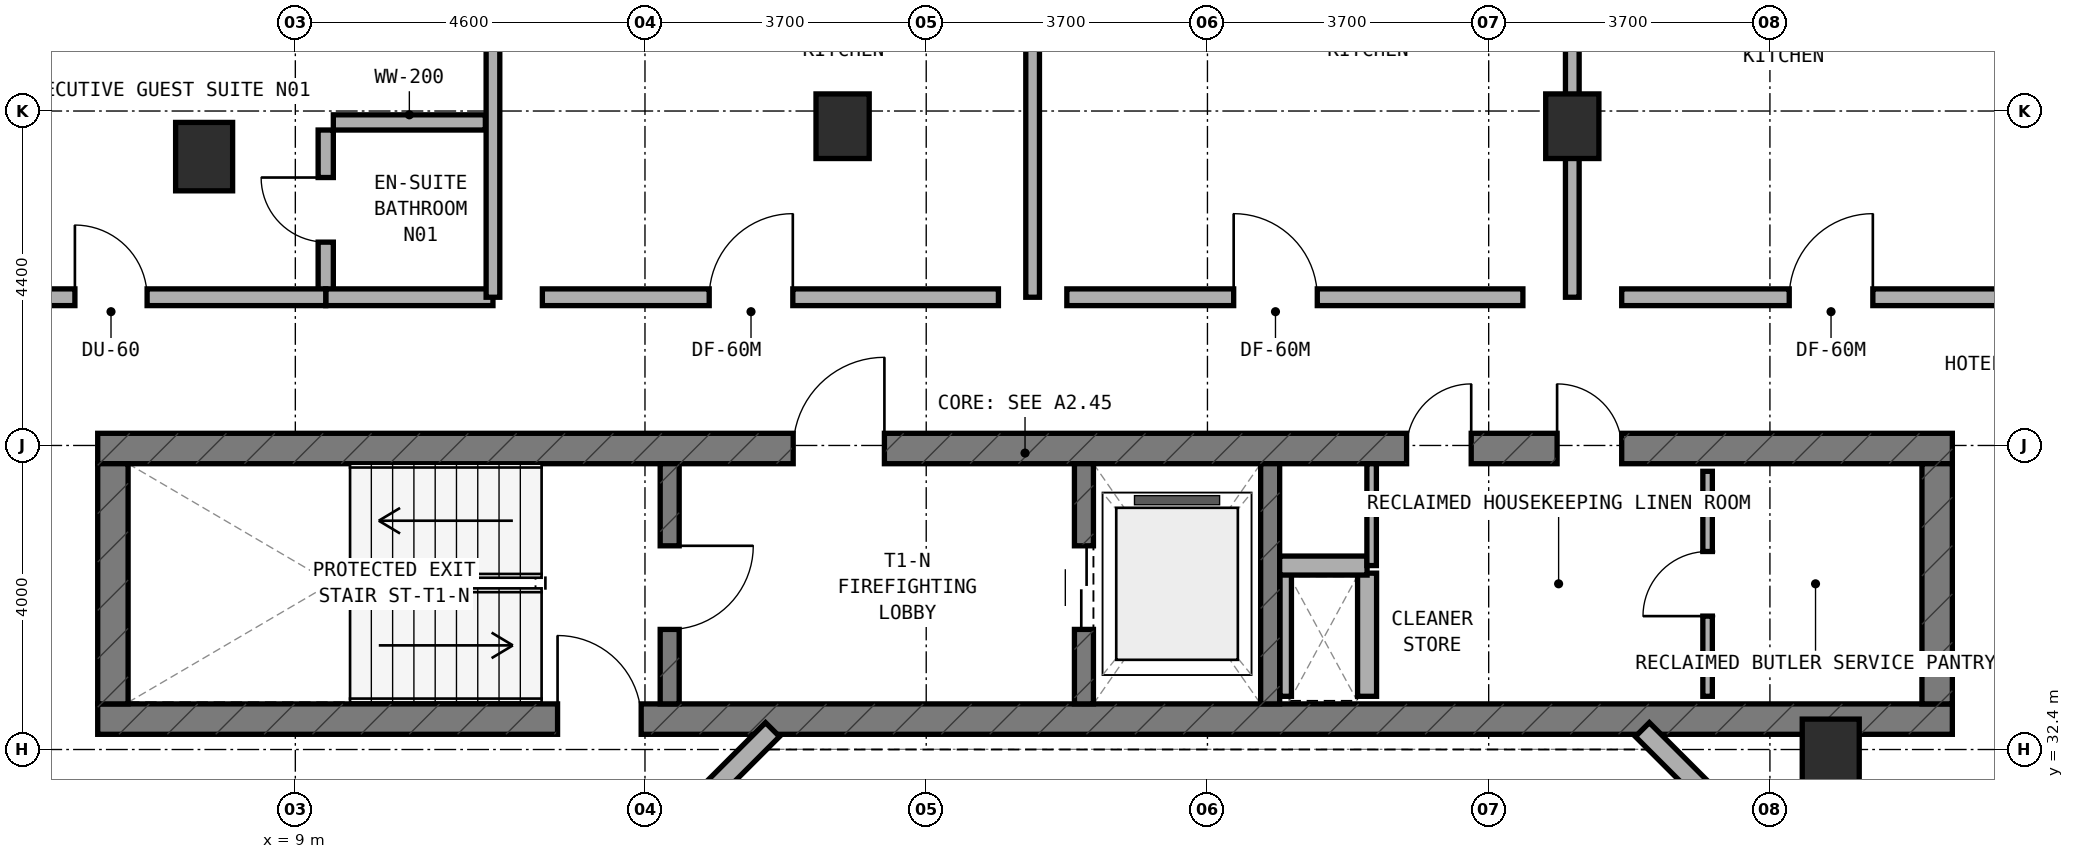
"""IFC4 building model, lengths in metres.
Left out: names, types, materials, properties, quantities, classifications, styles, units other than length and angle.
Written with IfcOpenShell. Run it as: python <this file> out.ifc"""

import sys

from ifc_helpers import new_model, si_unit, direction, frame, frame_2d, origin, origin_2d, place, context, subcontext, project, spatial, rectangle, extrude, element, fill, save


model = new_model("IFC4")
c1 = context("Model", 3, precision=1e-05, world=origin(), true_north=direction((0.0, 1.0)))
c2 = subcontext(c1, "Body", "Model", "MODEL_VIEW")
j1 = project(units=[si_unit("LENGTHUNIT", "METRE"), si_unit("PLANEANGLEUNIT", "RADIAN")], contexts=[c1])
p1 = place(None, origin())
s1 = spatial("IfcSite", under=j1, at=p1, CompositionType="ELEMENT")
p2 = place(p1, origin())
s2 = spatial("IfcBuilding", under=s1, at=p2, CompositionType="ELEMENT")
p3 = place(p2, frame((0.0, 0.0, 209.9)))
s3 = spatial("IfcBuildingStorey", under=s2, at=p3, CompositionType="ELEMENT", Elevation=209.9)
p4 = place(p3, frame((6.4, 32.8, 0.0), z_axis=(0.0, 0.0, 1.0), x_axis=(1.0, 0.0, 0.0)))
e1 = element("IfcWall", 1, at=p4, inside=s3, PredefinedType="SHEAR", context=c2, shape_type="SweptSolid", body=[
    extrude(rectangle(XDim=24.4, YDim=0.4, at=frame_2d((12.2, 0.0))), origin(), (0.0, 0.0, 1.0), 3.6),
])
p5 = place(p4, frame((6.05, 0.0, 0.0)))
e2 = element("IfcOpeningElement", 2, at=p5, cuts=e1, PredefinedType="OPENING", context=c2, shape_type="SweptSolid", body=[
    extrude(rectangle(XDim=1.1, YDim=2.15, at=frame_2d((0.55, 1.075))), frame((0.0, 0.21, 0.0), z_axis=(0.0, -1.0, 0.0), x_axis=(1.0, 0.0, 0.0)), (0.0, 0.0, 1.0), 0.42),
])
p6 = place(p3, frame((6.4, 36.36, 0.0), z_axis=(0.0, 0.0, 1.0), x_axis=(1.0, 0.0, 0.0)))
e3 = element("IfcWall", 3, at=p6, inside=s3, PredefinedType="SHEAR", context=c2, shape_type="SweptSolid", body=[
    extrude(rectangle(XDim=24.4, YDim=0.4, at=frame_2d((12.2, 0.0))), origin(), (0.0, 0.0, 1.0), 3.6),
])
p7 = place(p6, frame((9.15, 0.0, 0.0)))
e4 = element("IfcOpeningElement", 4, at=p7, cuts=e3, PredefinedType="OPENING", context=c2, shape_type="SweptSolid", body=[
    extrude(rectangle(XDim=1.2, YDim=2.15, at=frame_2d((0.6, 1.075))), frame((0.0, 0.21, 0.0), z_axis=(0.0, -1.0, 0.0), x_axis=(1.0, 0.0, 0.0)), (0.0, 0.0, 1.0), 0.42),
])
p8 = place(p6, frame((19.2, 0.0, 0.0)))
e5 = element("IfcOpeningElement", 5, at=p8, cuts=e3, PredefinedType="OPENING", context=c2, shape_type="SweptSolid", body=[
    extrude(rectangle(XDim=0.85, YDim=2.1, at=frame_2d((0.425, 1.05))), frame((0.0, 0.21, 0.0), z_axis=(0.0, -1.0, 0.0), x_axis=(1.0, 0.0, 0.0)), (0.0, 0.0, 1.0), 0.42),
])
p9 = place(p6, frame((17.22, 0.0, 0.0)))
e6 = element("IfcOpeningElement", 6, at=p9, cuts=e3, PredefinedType="OPENING", context=c2, shape_type="SweptSolid", body=[
    extrude(rectangle(XDim=0.85, YDim=2.1, at=frame_2d((0.425, 1.05))), frame((0.0, 0.21, 0.0), z_axis=(0.0, -1.0, 0.0), x_axis=(1.0, 0.0, 0.0)), (0.0, 0.0, 1.0), 0.42),
])
for number, where, z_axis, x_axis in (
    (7, (6.6, 33.0, 0.0), (0.0, 0.0, 1.0), (0.0, 1.0, 0.0)),
    (8, (30.6, 33.0, 0.0), (0.0, 0.0, 1.0), (0.0, 1.0, 0.0)),
):
    element("IfcWall", number, at=place(p3, frame(where, z_axis=z_axis, x_axis=x_axis)), inside=s3, PredefinedType="SHEAR", context=c2, shape_type="SweptSolid", body=[
        extrude(rectangle(XDim=3.16, YDim=0.4, at=frame_2d((1.58, 0.0))), origin(), (0.0, 0.0, 1.0), 3.6),
    ])
p10 = place(p3, frame((13.925, 33.0, 0.0), z_axis=(0.0, 0.0, 1.0), x_axis=(0.0, 1.0, 0.0)))
e9 = element("IfcWall", 9, at=p10, inside=s3, PredefinedType="STANDARD", context=c2, shape_type="SweptSolid", body=[
    extrude(rectangle(XDim=3.16, YDim=0.25, at=frame_2d((1.58, 0.0))), origin(), (0.0, 0.0, 1.0), 3.32),
])
p11 = place(p10, frame((0.98, 0.0, 0.0)))
e10 = element("IfcOpeningElement", 10, at=p11, cuts=e9, PredefinedType="OPENING", context=c2, shape_type="SweptSolid", body=[
    extrude(rectangle(XDim=1.1, YDim=2.15, at=frame_2d((0.55, 1.075))), frame((0.0, 0.135, 0.0), z_axis=(0.0, -1.0, 0.0), x_axis=(1.0, 0.0, 0.0)), (0.0, 0.0, 1.0), 0.27),
])
p12 = place(p3, frame((19.375, 33.0, 0.0), z_axis=(0.0, 0.0, 1.0), x_axis=(0.0, 1.0, 0.0)))
e11 = element("IfcWall", 11, at=p12, inside=s3, PredefinedType="STANDARD", context=c2, shape_type="SweptSolid", body=[
    extrude(rectangle(XDim=3.16, YDim=0.25, at=frame_2d((1.58, 0.0))), origin(), (0.0, 0.0, 1.0), 3.32),
])
p13 = place(p12, frame((0.98, 0.0, 0.0)))
e12 = element("IfcOpeningElement", 12, at=p13, cuts=e11, PredefinedType="OPENING", context=c2, shape_type="SweptSolid", body=[
    extrude(rectangle(XDim=1.1, YDim=2.15, at=frame_2d((0.55, 1.075))), frame((0.0, 0.135, 0.0), z_axis=(0.0, -1.0, 0.0), x_axis=(1.0, 0.0, 0.0)), (0.0, 0.0, 1.0), 0.27),
])
p14 = place(p3, frame((21.825, 33.0, 0.0), z_axis=(0.0, 0.0, 1.0), x_axis=(0.0, 1.0, 0.0)))
e13 = element("IfcWall", 13, at=p14, inside=s3, PredefinedType="STANDARD", context=c2, shape_type="SweptSolid", body=[
    extrude(rectangle(XDim=3.16, YDim=0.25, at=frame_2d((1.58, 0.0))), origin(), (0.0, 0.0, 1.0), 3.32),
])
for number, where, z_axis, x_axis in (
    (14, (16.2, 40.6, 0.0), (0.0, 0.0, 1.0), (1.0, 0.0, 0.0)),
    (15, (25.8, 40.6, 0.0), (0.0, 0.0, 1.0), (1.0, 0.0, 0.0)),
):
    element("IfcColumn", number, at=place(p3, frame(where, z_axis=z_axis, x_axis=x_axis)), inside=s3, PredefinedType="COLUMN", context=c2, shape_type="SweptSolid", body=[
        extrude(rectangle(XDim=0.7, YDim=0.85, at=origin_2d()), origin(), (0.0, 0.0, 1.0), 3.6),
    ])
for number, where, z_axis, x_axis in (
    (16, (7.8, 40.2, 0.0), (0.0, 0.0, 1.0), (1.0, 0.0, 0.0)),
    (17, (29.2, 32.35, 0.0), (0.0, 0.0, 1.0), (1.0, 0.0, 0.0)),
):
    element("IfcColumn", number, at=place(p3, frame(where, z_axis=z_axis, x_axis=x_axis)), inside=s3, PredefinedType="COLUMN", context=c2, shape_type="SweptSolid", body=[
        extrude(rectangle(XDim=0.75, YDim=0.9, at=origin_2d()), origin(), (0.0, 0.0, 1.0), 3.6),
    ])
for number, where, z_axis, x_axis in (
    (18, (28.556, 30.828, 0.0), (0.0, 0.0, 1.0), (-0.707, 0.707, 0.0)),
    (19, (15.278, 32.662, 0.0), (0.0, 0.0, 1.0), (-0.707, -0.707, 0.0)),
):
    element("IfcWall", number, at=place(p3, frame(where, z_axis=z_axis, x_axis=x_axis)), inside=s3, PredefinedType="STANDARD", context=c2, shape_type="SweptSolid", body=[
        extrude(rectangle(XDim=2.594, YDim=0.26, at=frame_2d((1.297, 0.0))), origin(), (0.0, 0.0, 1.0), 3.32),
    ])
p15 = place(p3, frame((27.58, 33.1, 0.0), z_axis=(0.0, 0.0, 1.0), x_axis=(0.0, 1.0, 0.0)))
e20 = element("IfcWall", 20, at=p15, inside=s3, PredefinedType="PARTITIONING", context=c2, shape_type="SweptSolid", body=[
    extrude(rectangle(XDim=2.96, YDim=0.125, at=frame_2d((1.48, 0.0))), origin(), (0.0, 0.0, 1.0), 3.32),
])
p16 = place(p15, frame((1.055, 0.0, 0.0)))
e21 = element("IfcOpeningElement", 21, at=p16, cuts=e20, PredefinedType="OPENING", context=c2, shape_type="SweptSolid", body=[
    extrude(rectangle(XDim=0.85, YDim=2.1, at=frame_2d((0.425, 1.05))), frame((0.0, 0.073, 0.0), z_axis=(0.0, -1.0, 0.0), x_axis=(1.0, 0.0, 0.0)), (0.0, 0.0, 1.0), 0.145),
])
p17 = place(p3, frame((22.03, 33.1, 0.0), z_axis=(0.0, 0.0, 1.0), x_axis=(0.0, 1.0, 0.0)))
e22 = element("IfcWall", 22, at=p17, inside=s3, PredefinedType="PARTITIONING", context=c2, shape_type="SweptSolid", body=[
    extrude(rectangle(XDim=1.62, YDim=0.15, at=frame_2d((0.81, 0.0))), origin(), (0.0, 0.0, 1.0), 3.32),
])
p18 = place(p3, frame((23.1, 33.1, 0.0), z_axis=(0.0, 0.0, 1.0), x_axis=(0.0, 1.0, 0.0)))
e23 = element("IfcWall", 23, at=p18, inside=s3, PredefinedType="SOLIDWALL", context=c2, shape_type="SweptSolid", body=[
    extrude(rectangle(XDim=1.62, YDim=0.25, at=frame_2d((0.81, 0.0))), origin(), (0.0, 0.0, 1.0), 3.32),
])
p19 = place(p3, frame((21.95, 34.82, 0.0), z_axis=(0.0, 0.0, 1.0), x_axis=(1.0, 0.0, 0.0)))
e24 = element("IfcWall", 24, at=p19, inside=s3, PredefinedType="SOLIDWALL", context=c2, shape_type="SweptSolid", body=[
    extrude(rectangle(XDim=1.15, YDim=0.25, at=frame_2d((0.575, 0.0))), origin(), (0.0, 0.0, 1.0), 3.32),
])
p20 = place(p3, frame((23.16, 34.82, 0.0), z_axis=(0.0, 0.0, 1.0), x_axis=(0.0, 1.0, 0.0)))
e25 = element("IfcWall", 25, at=p20, inside=s3, PredefinedType="PARTITIONING", context=c2, shape_type="SweptSolid", body=[
    extrude(rectangle(XDim=1.34, YDim=0.125, at=frame_2d((0.67, 0.0))), origin(), (0.0, 0.0, 1.0), 3.32),
])
p21 = place(p3, frame((9.4, 38.45, 0.0), z_axis=(0.0, 0.0, 1.0), x_axis=(0.0, 1.0, 0.0)))
e26 = element("IfcWall", 26, at=p21, inside=s3, PredefinedType="PLUMBINGWALL", context=c2, shape_type="SweptSolid", body=[
    extrude(rectangle(XDim=2.1, YDim=0.2, at=frame_2d((1.05, 0.0))), origin(), (0.0, 0.0, 1.0), 2.935),
])
p22 = place(p21, frame((0.625, 0.0, 0.0)))
e27 = element("IfcOpeningElement", 27, at=p22, cuts=e26, PredefinedType="OPENING", context=c2, shape_type="SweptSolid", body=[
    extrude(rectangle(XDim=0.85, YDim=2.1, at=frame_2d((0.425, 1.05))), frame((0.0, 0.11, 0.0), z_axis=(0.0, -1.0, 0.0), x_axis=(1.0, 0.0, 0.0)), (0.0, 0.0, 1.0), 0.22),
])
p23 = place(p3, frame((9.5, 40.65, 0.0), z_axis=(0.0, 0.0, 1.0), x_axis=(1.0, 0.0, 0.0)))
e28 = element("IfcWall", 28, at=p23, inside=s3, PredefinedType="PLUMBINGWALL", context=c2, shape_type="SweptSolid", body=[
    extrude(rectangle(XDim=2.0, YDim=0.2, at=frame_2d((1.0, 0.0))), origin(), (0.0, 0.0, 1.0), 3.32),
])
p24 = place(p3, frame((9.4, 38.35, 0.0), z_axis=(0.0, 0.0, 1.0), x_axis=(1.0, 0.0, 0.0)))
e29 = element("IfcWall", 29, at=p24, inside=s3, PredefinedType="SOLIDWALL", context=c2, shape_type="SweptSolid", body=[
    extrude(rectangle(XDim=2.2, YDim=0.22, at=frame_2d((1.1, 0.0))), origin(), (0.0, 0.0, 1.0), 3.32),
])
p25 = place(p3, frame((1.96, 38.35, 0.0), z_axis=(0.0, 0.0, 1.0), x_axis=(1.0, 0.0, 0.0)))
e30 = element("IfcWall", 30, at=p25, inside=s3, PredefinedType="SOLIDWALL", context=c2, shape_type="SweptSolid", body=[
    extrude(rectangle(XDim=7.44, YDim=0.22, at=frame_2d((3.72, 0.0))), origin(), (0.0, 0.0, 1.0), 2.695),
])
p26 = place(p25, frame((4.14, 0.0, 0.0)))
e31 = element("IfcOpeningElement", 31, at=p26, cuts=e30, PredefinedType="OPENING", context=c2, shape_type="SweptSolid", body=[
    extrude(rectangle(XDim=0.95, YDim=2.1, at=frame_2d((0.475, 1.05))), frame((0.0, 0.12, 0.0), z_axis=(0.0, -1.0, 0.0), x_axis=(1.0, 0.0, 0.0)), (0.0, 0.0, 1.0), 0.24),
])
p27 = place(p3, frame((11.6, 38.35, 0.0), z_axis=(0.0, 0.0, 1.0), x_axis=(0.0, 1.0, 0.0)))
e32 = element("IfcWall", 32, at=p27, inside=s3, PredefinedType="SOLIDWALL", context=c2, shape_type="SweptSolid", body=[
    extrude(rectangle(XDim=5.064, YDim=0.18, at=frame_2d((2.532, 0.0))), origin(), (0.0, 0.0, 1.0), 2.935),
])
p28 = place(p3, frame((18.7, 38.35, 0.0), z_axis=(0.0, 0.0, 1.0), x_axis=(0.0, 1.0, 0.0)))
e33 = element("IfcWall", 33, at=p28, inside=s3, PredefinedType="SOLIDWALL", context=c2, shape_type="SweptSolid", body=[
    extrude(rectangle(XDim=5.79, YDim=0.18, at=frame_2d((2.895, 0.0))), origin(), (0.0, 0.0, 1.0), 2.935),
])
p29 = place(p3, frame((12.25, 38.35, 0.0), z_axis=(0.0, 0.0, 1.0), x_axis=(1.0, 0.0, 0.0)))
e34 = element("IfcWall", 34, at=p29, inside=s3, PredefinedType="SOLIDWALL", context=c2, shape_type="SweptSolid", body=[
    extrude(rectangle(XDim=6.0, YDim=0.22, at=frame_2d((3.0, 0.0))), origin(), (0.0, 0.0, 1.0), 2.695),
])
p30 = place(p29, frame((2.195, 0.0, 0.0)))
e35 = element("IfcOpeningElement", 35, at=p30, cuts=e34, PredefinedType="OPENING", context=c2, shape_type="SweptSolid", body=[
    extrude(rectangle(XDim=1.1, YDim=2.1, at=frame_2d((0.55, 1.05))), frame((0.0, 0.12, 0.0), z_axis=(0.0, -1.0, 0.0), x_axis=(1.0, 0.0, 0.0)), (0.0, 0.0, 1.0), 0.24),
])
p31 = place(p3, frame((19.15, 38.35, 0.0), z_axis=(0.0, 0.0, 1.0), x_axis=(1.0, 0.0, 0.0)))
e36 = element("IfcWall", 36, at=p31, inside=s3, PredefinedType="SOLIDWALL", context=c2, shape_type="SweptSolid", body=[
    extrude(rectangle(XDim=6.0, YDim=0.22, at=frame_2d((3.0, 0.0))), origin(), (0.0, 0.0, 1.0), 3.32),
])
p32 = place(p31, frame((2.195, 0.0, 0.0)))
e37 = element("IfcOpeningElement", 37, at=p32, cuts=e36, PredefinedType="OPENING", context=c2, shape_type="SweptSolid", body=[
    extrude(rectangle(XDim=1.1, YDim=2.1, at=frame_2d((0.55, 1.05))), frame((0.0, 0.12, 0.0), z_axis=(0.0, -1.0, 0.0), x_axis=(1.0, 0.0, 0.0)), (0.0, 0.0, 1.0), 0.24),
])
p33 = place(p3, frame((25.8, 38.35, 0.0), z_axis=(0.0, 0.0, 1.0), x_axis=(0.0, 1.0, 0.0)))
e38 = element("IfcWall", 38, at=p33, inside=s3, PredefinedType="SOLIDWALL", context=c2, shape_type="SweptSolid", body=[
    extrude(rectangle(XDim=5.79, YDim=0.18, at=frame_2d((2.895, 0.0))), origin(), (0.0, 0.0, 1.0), 2.695),
])
p34 = place(p3, frame((26.45, 38.35, 0.0), z_axis=(0.0, 0.0, 1.0), x_axis=(1.0, 0.0, 0.0)))
e39 = element("IfcWall", 39, at=p34, inside=s3, PredefinedType="SOLIDWALL", context=c2, shape_type="SweptSolid", body=[
    extrude(rectangle(XDim=6.02, YDim=0.22, at=frame_2d((3.01, 0.0))), origin(), (0.0, 0.0, 1.0), 2.695),
])
p35 = place(p34, frame((2.204, 0.0, 0.0)))
e40 = element("IfcOpeningElement", 40, at=p35, cuts=e39, PredefinedType="OPENING", context=c2, shape_type="SweptSolid", body=[
    extrude(rectangle(XDim=1.1, YDim=2.1, at=frame_2d((0.55, 1.05))), frame((0.0, 0.12, 0.0), z_axis=(0.0, -1.0, 0.0), x_axis=(1.0, 0.0, 0.0)), (0.0, 0.0, 1.0), 0.24),
])
p36 = place(p11, frame((1.1, 0.0, 0.0), z_axis=(0.0, 0.0, 1.0), x_axis=(-1.0, 0.0, 0.0)))
e41 = element("IfcDoor", 41, at=p36, inside=s3, OperationType="SINGLE_SWING_LEFT", PredefinedType="DOOR", context=c2, shape_type="SweptSolid", body=[
    extrude(rectangle(XDim=1.1, YDim=2.15, at=frame_2d((0.55, 1.075))), frame((0.0, 0.025, 0.0), z_axis=(0.0, -1.0, 0.0), x_axis=(1.0, 0.0, 0.0)), (0.0, 0.0, 1.0), 0.05),
])
fill(e10, e41)
p37 = place(p7, origin())
e42 = element("IfcDoor", 42, at=p37, inside=s3, OperationType="SINGLE_SWING_RIGHT", PredefinedType="DOOR", context=c2, shape_type="SweptSolid", body=[
    extrude(rectangle(XDim=1.2, YDim=2.15, at=frame_2d((0.6, 1.075))), frame((0.0, 0.025, 0.0), z_axis=(0.0, -1.0, 0.0), x_axis=(1.0, 0.0, 0.0)), (0.0, 0.0, 1.0), 0.05),
])
fill(e4, e42)
p38 = place(p13, origin())
e43 = element("IfcDoor", 43, at=p38, inside=s3, OperationType="DOUBLE_DOOR_SLIDING", PredefinedType="DOOR", context=c2, shape_type="SweptSolid", body=[
    extrude(rectangle(XDim=1.1, YDim=2.15, at=frame_2d((0.55, 1.075))), frame((0.0, 0.025, 0.0), z_axis=(0.0, -1.0, 0.0), x_axis=(1.0, 0.0, 0.0)), (0.0, 0.0, 1.0), 0.05),
])
fill(e12, e43)
p39 = place(p8, origin())
e44 = element("IfcDoor", 44, at=p39, inside=s3, OperationType="SINGLE_SWING_LEFT", PredefinedType="DOOR", context=c2, shape_type="SweptSolid", body=[
    extrude(rectangle(XDim=0.85, YDim=2.1, at=frame_2d((0.425, 1.05))), frame((0.0, 0.025, 0.0), z_axis=(0.0, -1.0, 0.0), x_axis=(1.0, 0.0, 0.0)), (0.0, 0.0, 1.0), 0.05),
])
fill(e5, e44)
p40 = place(p9, origin())
e45 = element("IfcDoor", 45, at=p40, inside=s3, OperationType="SINGLE_SWING_RIGHT", PredefinedType="DOOR", context=c2, shape_type="SweptSolid", body=[
    extrude(rectangle(XDim=0.85, YDim=2.1, at=frame_2d((0.425, 1.05))), frame((0.0, 0.025, 0.0), z_axis=(0.0, -1.0, 0.0), x_axis=(1.0, 0.0, 0.0)), (0.0, 0.0, 1.0), 0.05),
])
fill(e6, e45)
p41 = place(p5, origin())
e46 = element("IfcDoor", 46, at=p41, inside=s3, OperationType="SINGLE_SWING_LEFT", PredefinedType="DOOR", context=c2, shape_type="SweptSolid", body=[
    extrude(rectangle(XDim=1.1, YDim=2.15, at=frame_2d((0.55, 1.075))), frame((0.0, 0.025, 0.0), z_axis=(0.0, -1.0, 0.0), x_axis=(1.0, 0.0, 0.0)), (0.0, 0.0, 1.0), 0.05),
])
fill(e2, e46)
p42 = place(p16, origin())
e47 = element("IfcDoor", 47, at=p42, inside=s3, OperationType="SINGLE_SWING_LEFT", PredefinedType="DOOR", context=c2, shape_type="SweptSolid", body=[
    extrude(rectangle(XDim=0.85, YDim=2.1, at=frame_2d((0.425, 1.05))), frame((0.0, 0.025, 0.0), z_axis=(0.0, -1.0, 0.0), x_axis=(1.0, 0.0, 0.0)), (0.0, 0.0, 1.0), 0.05),
])
fill(e21, e47)
p43 = place(p22, origin())
e48 = element("IfcDoor", 48, at=p43, inside=s3, OperationType="SINGLE_SWING_RIGHT", PredefinedType="DOOR", context=c2, shape_type="SweptSolid", body=[
    extrude(rectangle(XDim=0.85, YDim=2.1, at=frame_2d((0.425, 1.05))), frame((0.0, 0.025, 0.0), z_axis=(0.0, -1.0, 0.0), x_axis=(1.0, 0.0, 0.0)), (0.0, 0.0, 1.0), 0.05),
])
fill(e27, e48)
p44 = place(p26, origin())
e49 = element("IfcDoor", 49, at=p44, inside=s3, OperationType="SINGLE_SWING_LEFT", PredefinedType="DOOR", context=c2, shape_type="SweptSolid", body=[
    extrude(rectangle(XDim=0.95, YDim=2.1, at=frame_2d((0.475, 1.05))), frame((0.0, 0.025, 0.0), z_axis=(0.0, -1.0, 0.0), x_axis=(1.0, 0.0, 0.0)), (0.0, 0.0, 1.0), 0.05),
])
fill(e31, e49)
p45 = place(p30, origin())
e50 = element("IfcDoor", 50, at=p45, inside=s3, OperationType="SINGLE_SWING_RIGHT", PredefinedType="DOOR", context=c2, shape_type="SweptSolid", body=[
    extrude(rectangle(XDim=1.1, YDim=2.1, at=frame_2d((0.55, 1.05))), frame((0.0, 0.025, 0.0), z_axis=(0.0, -1.0, 0.0), x_axis=(1.0, 0.0, 0.0)), (0.0, 0.0, 1.0), 0.05),
])
fill(e35, e50)
p46 = place(p32, origin())
e51 = element("IfcDoor", 51, at=p46, inside=s3, OperationType="SINGLE_SWING_LEFT", PredefinedType="DOOR", context=c2, shape_type="SweptSolid", body=[
    extrude(rectangle(XDim=1.1, YDim=2.1, at=frame_2d((0.55, 1.05))), frame((0.0, 0.025, 0.0), z_axis=(0.0, -1.0, 0.0), x_axis=(1.0, 0.0, 0.0)), (0.0, 0.0, 1.0), 0.05),
])
fill(e37, e51)
p47 = place(p35, origin())
e52 = element("IfcDoor", 52, at=p47, inside=s3, OperationType="SINGLE_SWING_RIGHT", PredefinedType="DOOR", context=c2, shape_type="SweptSolid", body=[
    extrude(rectangle(XDim=1.1, YDim=2.1, at=frame_2d((0.55, 1.05))), frame((0.0, 0.025, 0.0), z_axis=(0.0, -1.0, 0.0), x_axis=(1.0, 0.0, 0.0)), (0.0, 0.0, 1.0), 0.05),
])
fill(e40, e52)
save(model, sys.argv[1])
